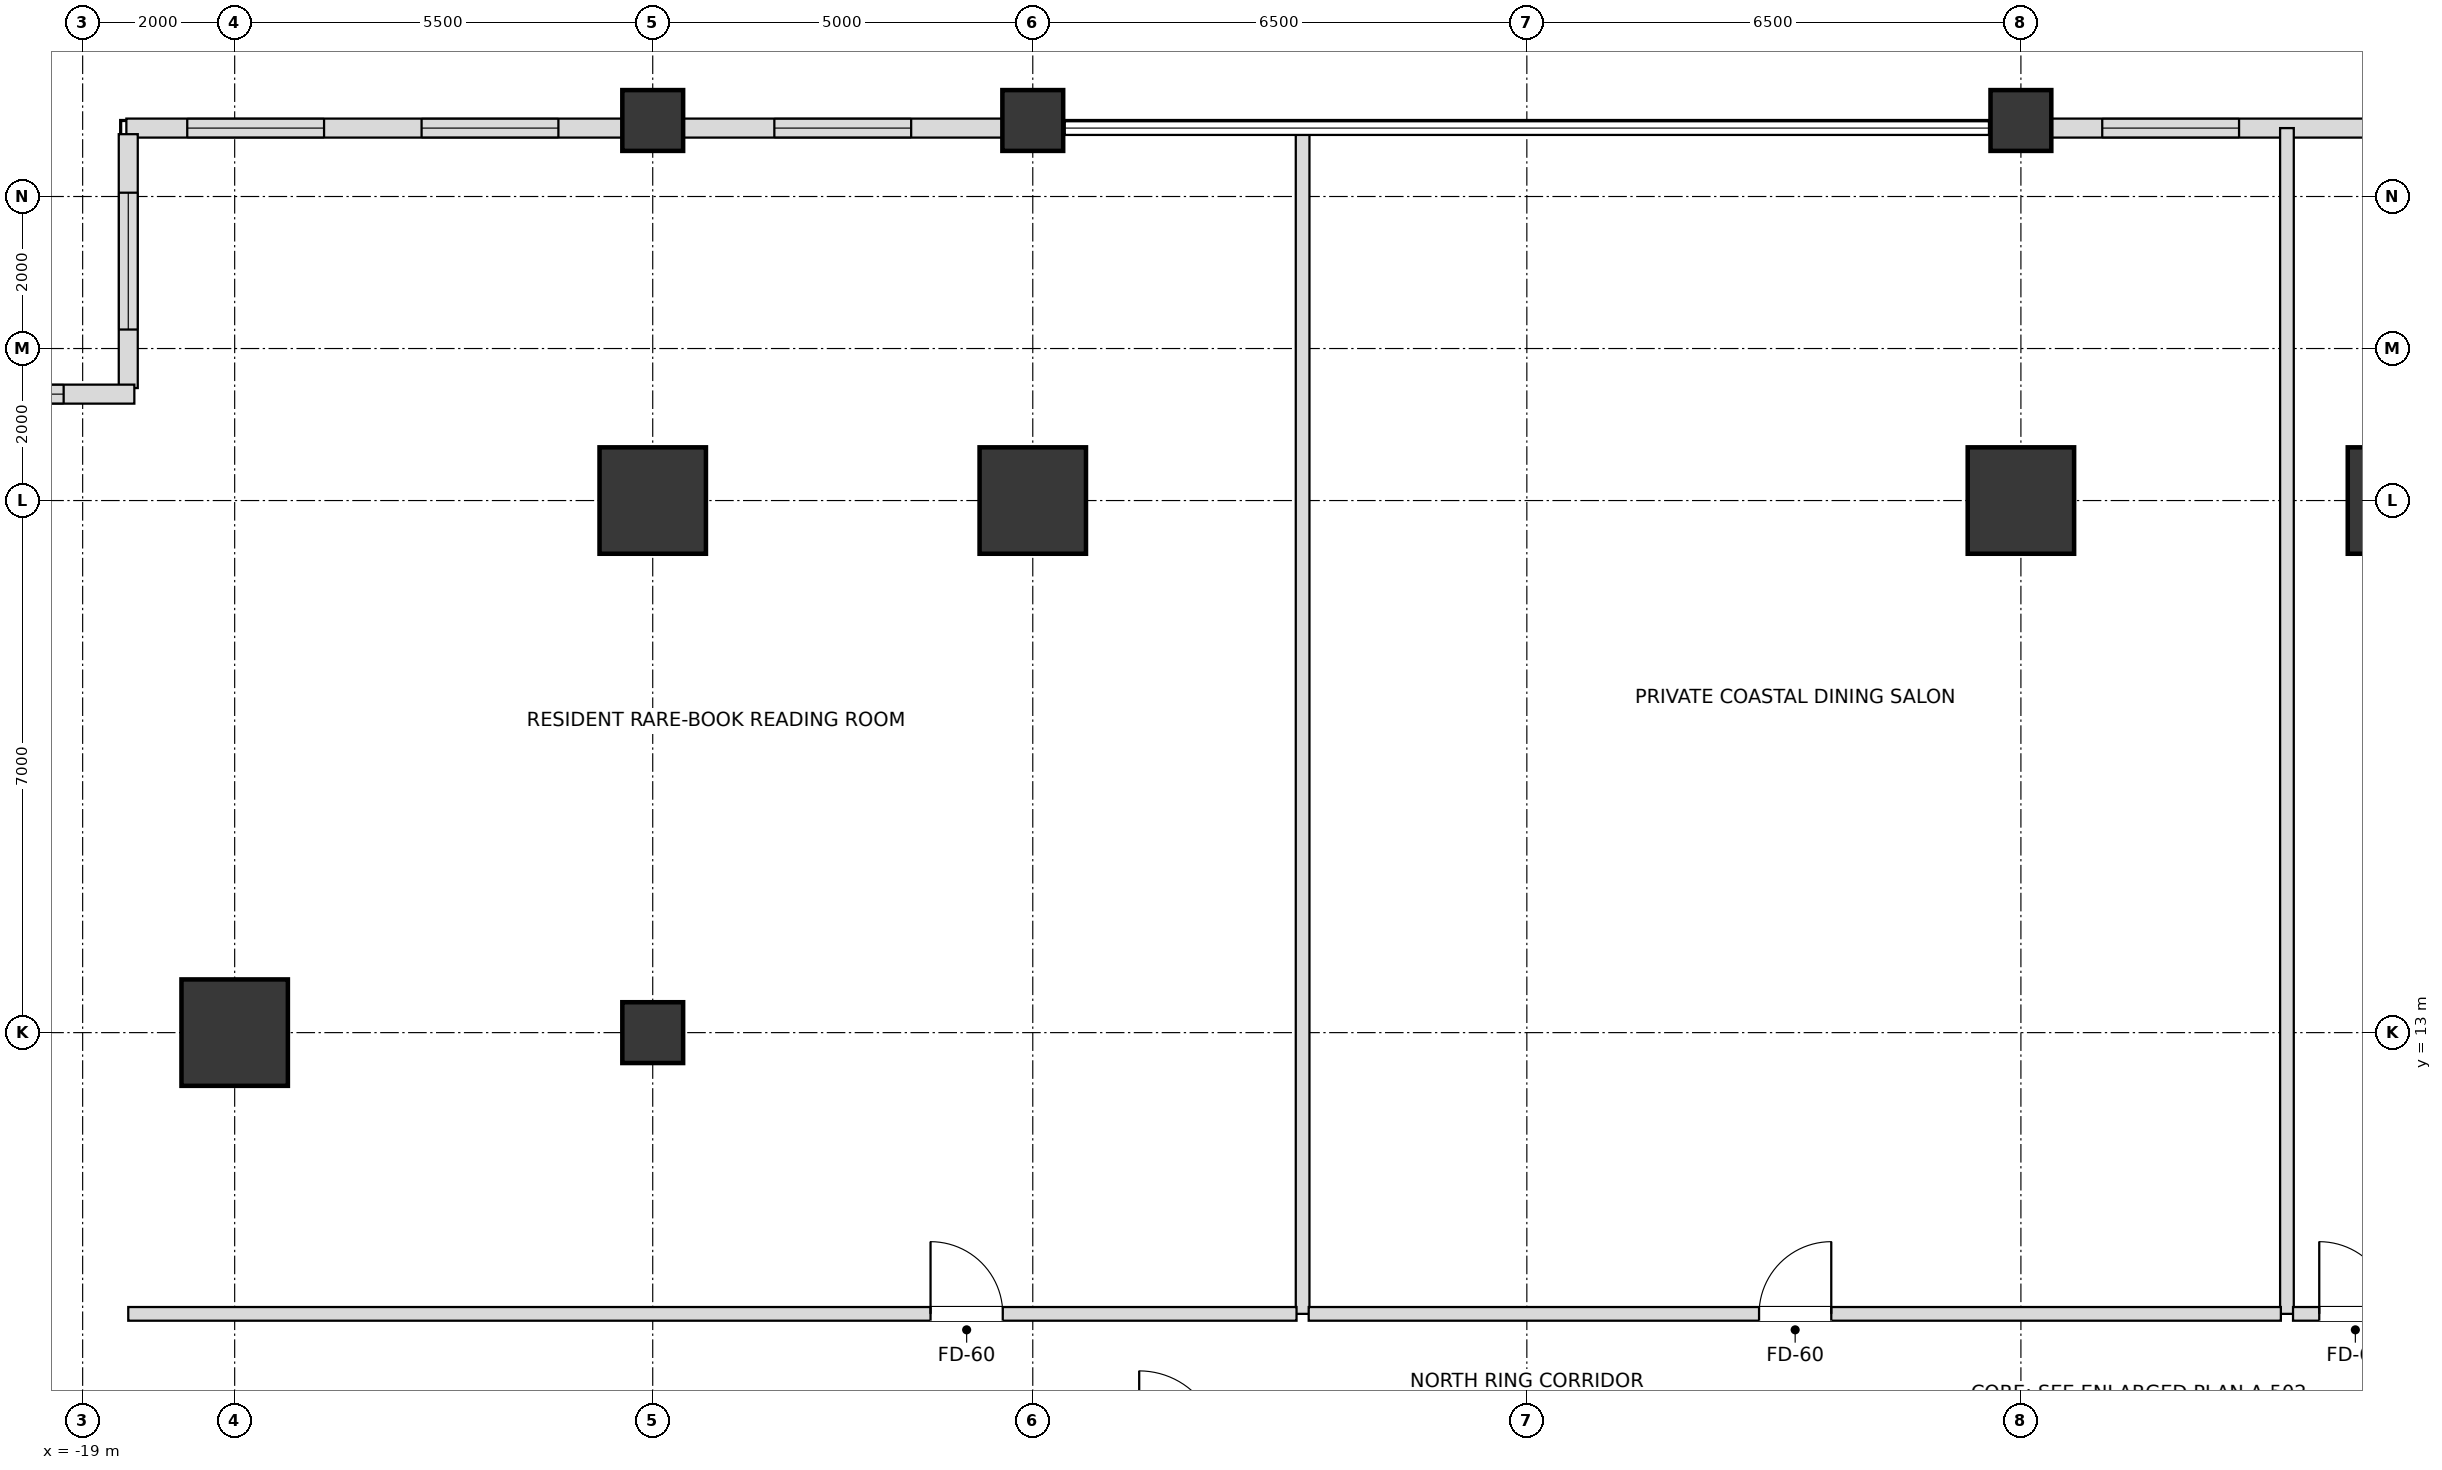
"""IFC4 building model, lengths in metres.
Left out: names, types, materials, properties, quantities, classifications, styles, units other than length and angle.
Written with IfcOpenShell. Run it as: python <this file> out.ifc"""

import sys

from ifc_helpers import new_model, si_unit, direction, frame, frame_2d, origin, origin_2d, place, context, subcontext, project, spatial, rectangle, extrude, element, fill, save


model = new_model("IFC4")
c1 = context("Model", 3, precision=1e-05, world=origin(), true_north=direction((0.0, 1.0)))
c2 = subcontext(c1, "Body", "Model", "MODEL_VIEW")
j1 = project(units=[si_unit("LENGTHUNIT", "METRE"), si_unit("PLANEANGLEUNIT", "RADIAN")], contexts=[c1])
p1 = place(None, origin())
s1 = spatial("IfcSite", under=j1, at=p1, CompositionType="ELEMENT")
p2 = place(p1, origin())
s2 = spatial("IfcBuilding", under=s1, at=p2, CompositionType="ELEMENT")
p3 = place(p2, frame((0.0, 0.0, 79.2)))
s3 = spatial("IfcBuildingStorey", under=s2, at=p3, CompositionType="ELEMENT", Elevation=79.2)
for number, where, z_axis, x_axis in (
    (1, (11.5, 20.0, 0.0), (0.0, 0.0, 1.0), (1.0, 0.0, 0.0)),
    (2, (6.5, 20.0, 0.0), (0.0, 0.0, 1.0), (1.0, 0.0, 0.0)),
    (3, (-6.5, 20.0, 0.0), (0.0, 0.0, 1.0), (1.0, 0.0, 0.0)),
    (4, (-11.5, 20.0, 0.0), (0.0, 0.0, 1.0), (1.0, 0.0, 0.0)),
    (5, (-17.0, 13.0, 0.0), (0.0, 0.0, 1.0), (1.0, 0.0, 0.0)),
):
    element("IfcColumn", number, at=place(p3, frame(where, z_axis=z_axis, x_axis=x_axis)), inside=s3, PredefinedType="USERDEFINED", context=c2, shape_type="SweptSolid", body=[
        extrude(rectangle(XDim=1.4, YDim=1.4, at=origin_2d()), origin(), (0.0, 0.0, 1.0), 3.6),
    ])
for number, where, z_axis, x_axis in (
    (6, (-11.5, 13.0, 0.0), (0.0, 0.0, 1.0), (1.0, 0.0, 0.0)),
    (7, (-11.5, 25.0, 0.0), (0.0, 0.0, 1.0), (1.0, 0.0, 0.0)),
    (8, (-6.5, 25.0, 0.0), (0.0, 0.0, 1.0), (1.0, 0.0, 0.0)),
    (9, (6.5, 25.0, 0.0), (0.0, 0.0, 1.0), (1.0, 0.0, 0.0)),
):
    element("IfcColumn", number, at=place(p3, frame(where, z_axis=z_axis, x_axis=x_axis)), inside=s3, PredefinedType="COLUMN", context=c2, shape_type="SweptSolid", body=[
        extrude(rectangle(XDim=0.8, YDim=0.8, at=origin_2d()), origin(), (0.0, 0.0, 1.0), 3.6),
    ])
p4 = place(p3, frame((11.105, 24.9, 0.0), z_axis=(0.0, 0.0, 1.0), x_axis=(-1.0, 0.0, 0.0)))
e10 = element("IfcWall", 10, at=p4, inside=s3, PredefinedType="SOLIDWALL", context=c2, shape_type="SweptSolid", body=[
    extrude(rectangle(XDim=4.21, YDim=0.25, at=frame_2d((2.105, 0.0))), origin(), (0.0, 0.0, 1.0), 2.736),
])
p5 = place(p4, frame((1.735, 0.0, 0.72)))
e11 = element("IfcOpeningElement", 11, at=p5, cuts=e10, PredefinedType="OPENING", context=c2, shape_type="SweptSolid", body=[
    extrude(rectangle(XDim=1.8, YDim=1.68, at=frame_2d((0.9, 0.84))), frame((0.0, 0.135, 0.0), z_axis=(0.0, -1.0, 0.0), x_axis=(1.0, 0.0, 0.0)), (0.0, 0.0, 1.0), 0.27),
])
p6 = place(p3, frame((-6.895, 24.9, 0.0), z_axis=(0.0, 0.0, 1.0), x_axis=(-1.0, 0.0, 0.0)))
e12 = element("IfcWall", 12, at=p6, inside=s3, PredefinedType="SOLIDWALL", context=c2, shape_type="SweptSolid", body=[
    extrude(rectangle(XDim=4.21, YDim=0.25, at=frame_2d((2.105, 0.0))), origin(), (0.0, 0.0, 1.0), 2.736),
])
p7 = place(p6, frame((1.205, 0.0, 0.72)))
e13 = element("IfcOpeningElement", 13, at=p7, cuts=e12, PredefinedType="OPENING", context=c2, shape_type="SweptSolid", body=[
    extrude(rectangle(XDim=1.8, YDim=1.68, at=frame_2d((0.9, 0.84))), frame((0.0, 0.135, 0.0), z_axis=(0.0, -1.0, 0.0), x_axis=(1.0, 0.0, 0.0)), (0.0, 0.0, 1.0), 0.27),
])
p8 = place(p3, frame((-11.895, 24.9, 0.0), z_axis=(0.0, 0.0, 1.0), x_axis=(-1.0, 0.0, 0.0)))
e14 = element("IfcWall", 14, at=p8, inside=s3, PredefinedType="SOLIDWALL", context=c2, shape_type="SweptSolid", body=[
    extrude(rectangle(XDim=6.53, YDim=0.25, at=frame_2d((3.265, 0.0))), origin(), (0.0, 0.0, 1.0), 2.736),
])
p9 = place(p8, frame((0.846, 0.0, 0.72)))
e15 = element("IfcOpeningElement", 15, at=p9, cuts=e14, PredefinedType="OPENING", context=c2, shape_type="SweptSolid", body=[
    extrude(rectangle(XDim=1.8, YDim=1.68, at=frame_2d((0.9, 0.84))), frame((0.0, 0.135, 0.0), z_axis=(0.0, -1.0, 0.0), x_axis=(1.0, 0.0, 0.0)), (0.0, 0.0, 1.0), 0.27),
])
p10 = place(p8, frame((3.929, 0.0, 0.72)))
e16 = element("IfcOpeningElement", 16, at=p10, cuts=e14, PredefinedType="OPENING", context=c2, shape_type="SweptSolid", body=[
    extrude(rectangle(XDim=1.8, YDim=1.68, at=frame_2d((0.9, 0.84))), frame((0.0, 0.135, 0.0), z_axis=(0.0, -1.0, 0.0), x_axis=(1.0, 0.0, 0.0)), (0.0, 0.0, 1.0), 0.27),
])
p11 = place(p3, frame((-18.4, 24.82, 0.0), z_axis=(0.0, 0.0, 1.0), x_axis=(0.0, -1.0, 0.0)))
e17 = element("IfcWall", 17, at=p11, inside=s3, PredefinedType="SOLIDWALL", context=c2, shape_type="SweptSolid", body=[
    extrude(rectangle(XDim=3.34, YDim=0.25, at=frame_2d((1.67, 0.0))), origin(), (0.0, 0.0, 1.0), 2.736),
])
p12 = place(p11, frame((0.77, 0.0, 0.72)))
e18 = element("IfcOpeningElement", 18, at=p12, cuts=e17, PredefinedType="OPENING", context=c2, shape_type="SweptSolid", body=[
    extrude(rectangle(XDim=1.8, YDim=1.68, at=frame_2d((0.9, 0.84))), frame((0.0, 0.135, 0.0), z_axis=(0.0, -1.0, 0.0), x_axis=(1.0, 0.0, 0.0)), (0.0, 0.0, 1.0), 0.27),
])
p13 = place(p3, frame((-18.32, 21.4, 0.0), z_axis=(0.0, 0.0, 1.0), x_axis=(-1.0, 0.0, 0.0)))
e19 = element("IfcWall", 19, at=p13, inside=s3, PredefinedType="SOLIDWALL", context=c2, shape_type="SweptSolid", body=[
    extrude(rectangle(XDim=3.66, YDim=0.25, at=frame_2d((1.83, 0.0))), origin(), (0.0, 0.0, 1.0), 2.736),
])
p14 = place(p13, frame((0.93, 0.0, 0.72)))
e20 = element("IfcOpeningElement", 20, at=p14, cuts=e19, PredefinedType="OPENING", context=c2, shape_type="SweptSolid", body=[
    extrude(rectangle(XDim=1.8, YDim=1.68, at=frame_2d((0.9, 0.84))), frame((0.0, 0.135, 0.0), z_axis=(0.0, -1.0, 0.0), x_axis=(1.0, 0.0, 0.0)), (0.0, 0.0, 1.0), 0.27),
])
for number, where, z_axis, x_axis in (
    (21, (-2.95, 9.3, 0.0), (0.0, 0.0, 1.0), (0.0, 1.0, 0.0)),
    (22, (10.0, 9.3, 0.0), (0.0, 0.0, 1.0), (0.0, 1.0, 0.0)),
):
    element("IfcWall", number, at=place(p3, frame(where, z_axis=z_axis, x_axis=x_axis)), inside=s3, PredefinedType="PARTITIONING", context=c2, shape_type="SweptSolid", body=[
        extrude(rectangle(XDim=15.6, YDim=0.18, at=frame_2d((7.8, 0.0))), origin(), (0.0, 0.0, 1.0), 2.816),
    ])
p15 = place(p3, frame((-18.4, 9.3, 0.0), z_axis=(0.0, 0.0, 1.0), x_axis=(1.0, 0.0, 0.0)))
e23 = element("IfcWall", 23, at=p15, inside=s3, PredefinedType="PARTITIONING", context=c2, shape_type="SweptSolid", body=[
    extrude(rectangle(XDim=15.37, YDim=0.18, at=frame_2d((7.685, 0.0))), origin(), (0.0, 0.0, 1.0), 2.816),
])
p16 = place(p15, frame((10.555, 0.0, 0.0)))
e24 = element("IfcOpeningElement", 24, at=p16, cuts=e23, PredefinedType="OPENING", context=c2, shape_type="SweptSolid", body=[
    extrude(rectangle(XDim=0.95, YDim=2.15, at=frame_2d((0.475, 1.075))), frame((0.0, 0.1, 0.0), z_axis=(0.0, -1.0, 0.0), x_axis=(1.0, 0.0, 0.0)), (0.0, 0.0, 1.0), 0.2),
])
p17 = place(p3, frame((-2.87, 9.3, 0.0), z_axis=(0.0, 0.0, 1.0), x_axis=(1.0, 0.0, 0.0)))
e25 = element("IfcWall", 25, at=p17, inside=s3, PredefinedType="PARTITIONING", context=c2, shape_type="SweptSolid", body=[
    extrude(rectangle(XDim=12.79, YDim=0.18, at=frame_2d((6.395, 0.0))), origin(), (0.0, 0.0, 1.0), 2.816),
])
p18 = place(p17, frame((5.925, 0.0, 0.0)))
e26 = element("IfcOpeningElement", 26, at=p18, cuts=e25, PredefinedType="OPENING", context=c2, shape_type="SweptSolid", body=[
    extrude(rectangle(XDim=0.95, YDim=2.15, at=frame_2d((0.475, 1.075))), frame((0.0, 0.1, 0.0), z_axis=(0.0, -1.0, 0.0), x_axis=(1.0, 0.0, 0.0)), (0.0, 0.0, 1.0), 0.2),
])
p19 = place(p3, frame((10.08, 9.3, 0.0), z_axis=(0.0, 0.0, 1.0), x_axis=(1.0, 0.0, 0.0)))
e27 = element("IfcWall", 27, at=p19, inside=s3, PredefinedType="PARTITIONING", context=c2, shape_type="SweptSolid", body=[
    extrude(rectangle(XDim=8.32, YDim=0.18, at=frame_2d((4.16, 0.0))), origin(), (0.0, 0.0, 1.0), 2.816),
])
p20 = place(p19, frame((0.345, 0.0, 0.0)))
e28 = element("IfcOpeningElement", 28, at=p20, cuts=e27, PredefinedType="OPENING", context=c2, shape_type="SweptSolid", body=[
    extrude(rectangle(XDim=0.95, YDim=2.15, at=frame_2d((0.475, 1.075))), frame((0.0, 0.1, 0.0), z_axis=(0.0, -1.0, 0.0), x_axis=(1.0, 0.0, 0.0)), (0.0, 0.0, 1.0), 0.2),
])
p21 = place(p5, origin())
e29 = element("IfcWindow", 29, at=p21, inside=s3, PartitioningType="SINGLE_PANEL", PredefinedType="WINDOW", context=c2, shape_type="SweptSolid", body=[
    extrude(rectangle(XDim=1.8, YDim=1.68, at=frame_2d((0.9, 0.84))), frame((0.0, 0.03, 0.0), z_axis=(0.0, -1.0, 0.0), x_axis=(1.0, 0.0, 0.0)), (0.0, 0.0, 1.0), 0.06),
])
fill(e11, e29)
p22 = place(p7, origin())
e30 = element("IfcWindow", 30, at=p22, inside=s3, PartitioningType="SINGLE_PANEL", PredefinedType="WINDOW", context=c2, shape_type="SweptSolid", body=[
    extrude(rectangle(XDim=1.8, YDim=1.68, at=frame_2d((0.9, 0.84))), frame((0.0, 0.03, 0.0), z_axis=(0.0, -1.0, 0.0), x_axis=(1.0, 0.0, 0.0)), (0.0, 0.0, 1.0), 0.06),
])
fill(e13, e30)
p23 = place(p9, origin())
e31 = element("IfcWindow", 31, at=p23, inside=s3, PartitioningType="SINGLE_PANEL", PredefinedType="WINDOW", context=c2, shape_type="SweptSolid", body=[
    extrude(rectangle(XDim=1.8, YDim=1.68, at=frame_2d((0.9, 0.84))), frame((0.0, 0.03, 0.0), z_axis=(0.0, -1.0, 0.0), x_axis=(1.0, 0.0, 0.0)), (0.0, 0.0, 1.0), 0.06),
])
fill(e15, e31)
p24 = place(p10, origin())
e32 = element("IfcWindow", 32, at=p24, inside=s3, PartitioningType="SINGLE_PANEL", PredefinedType="WINDOW", context=c2, shape_type="SweptSolid", body=[
    extrude(rectangle(XDim=1.8, YDim=1.68, at=frame_2d((0.9, 0.84))), frame((0.0, 0.03, 0.0), z_axis=(0.0, -1.0, 0.0), x_axis=(1.0, 0.0, 0.0)), (0.0, 0.0, 1.0), 0.06),
])
fill(e16, e32)
p25 = place(p12, origin())
e33 = element("IfcWindow", 33, at=p25, inside=s3, PartitioningType="SINGLE_PANEL", PredefinedType="WINDOW", context=c2, shape_type="SweptSolid", body=[
    extrude(rectangle(XDim=1.8, YDim=1.68, at=frame_2d((0.9, 0.84))), frame((0.0, 0.03, 0.0), z_axis=(0.0, -1.0, 0.0), x_axis=(1.0, 0.0, 0.0)), (0.0, 0.0, 1.0), 0.06),
])
fill(e18, e33)
p26 = place(p14, origin())
e34 = element("IfcWindow", 34, at=p26, inside=s3, PartitioningType="SINGLE_PANEL", PredefinedType="WINDOW", context=c2, shape_type="SweptSolid", body=[
    extrude(rectangle(XDim=1.8, YDim=1.68, at=frame_2d((0.9, 0.84))), frame((0.0, 0.03, 0.0), z_axis=(0.0, -1.0, 0.0), x_axis=(1.0, 0.0, 0.0)), (0.0, 0.0, 1.0), 0.06),
])
fill(e20, e34)
p27 = place(p16, origin())
e35 = element("IfcDoor", 35, at=p27, inside=s3, OperationType="SINGLE_SWING_LEFT", PredefinedType="DOOR", context=c2, shape_type="SweptSolid", body=[
    extrude(rectangle(XDim=0.95, YDim=2.15, at=frame_2d((0.475, 1.075))), frame((0.0, 0.025, 0.0), z_axis=(0.0, -1.0, 0.0), x_axis=(1.0, 0.0, 0.0)), (0.0, 0.0, 1.0), 0.05),
])
fill(e24, e35)
p28 = place(p18, origin())
e36 = element("IfcDoor", 36, at=p28, inside=s3, OperationType="SINGLE_SWING_RIGHT", PredefinedType="DOOR", context=c2, shape_type="SweptSolid", body=[
    extrude(rectangle(XDim=0.95, YDim=2.15, at=frame_2d((0.475, 1.075))), frame((0.0, 0.025, 0.0), z_axis=(0.0, -1.0, 0.0), x_axis=(1.0, 0.0, 0.0)), (0.0, 0.0, 1.0), 0.05),
])
fill(e26, e36)
p29 = place(p20, origin())
e37 = element("IfcDoor", 37, at=p29, inside=s3, OperationType="SINGLE_SWING_LEFT", PredefinedType="DOOR", context=c2, shape_type="SweptSolid", body=[
    extrude(rectangle(XDim=0.95, YDim=2.15, at=frame_2d((0.475, 1.075))), frame((0.0, 0.025, 0.0), z_axis=(0.0, -1.0, 0.0), x_axis=(1.0, 0.0, 0.0)), (0.0, 0.0, 1.0), 0.05),
])
fill(e28, e37)
save(model, sys.argv[1])
